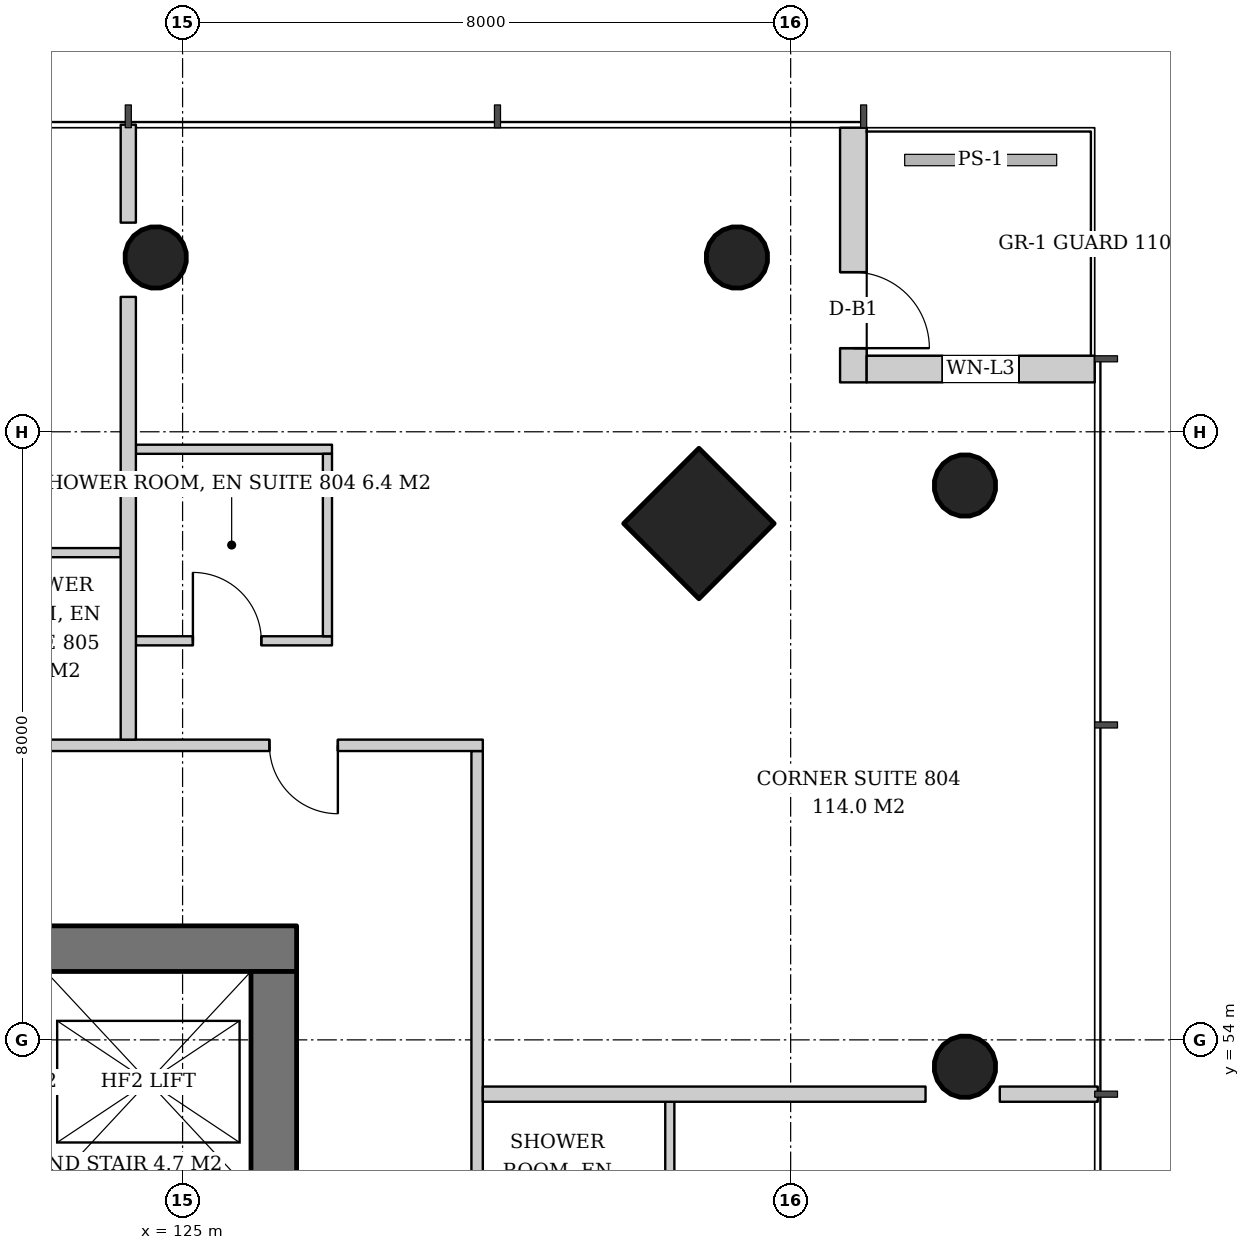
"""IFC4 building model, lengths in metres.
Left out: names, types, materials, properties, quantities, classifications, styles, units other than length and angle.
Written with IfcOpenShell. Run it as: python <this file> out.ifc"""

import sys

from ifc_helpers import new_model, si_unit, direction, frame, frame_2d, origin, origin_2d, place, context, subcontext, project, spatial, rectangle, hollow_circle, extrude, element, fill, save


model = new_model("IFC4")
c1 = context("Model", 3, precision=1e-05, world=origin(), true_north=direction((0.0, 1.0)))
c2 = subcontext(c1, "Body", "Model", "MODEL_VIEW")
j1 = project(units=[si_unit("LENGTHUNIT", "METRE"), si_unit("PLANEANGLEUNIT", "RADIAN")], contexts=[c1])
p1 = place(None, origin())
s1 = spatial("IfcSite", under=j1, at=p1, CompositionType="ELEMENT")
p2 = place(p1, origin())
s2 = spatial("IfcBuilding", under=s1, at=p2, CompositionType="ELEMENT")
p3 = place(p2, frame((0.0, 0.0, 36.2)))
s3 = spatial("IfcBuildingStorey", under=s2, at=p3, CompositionType="ELEMENT", Elevation=36.2)
p4 = place(p3, frame((131.845, 60.845, 0.0), z_axis=(-0.042965756413, -0.042965756413, 0.998152236661), x_axis=(0.707106781187, -0.707106781187, 0.0)))
e1 = element("IfcColumn", 1, at=p4, inside=s3, PredefinedType="COLUMN", context=c2, shape_type="SweptSolid", body=[
    extrude(rectangle(XDim=1.4, YDim=1.4, at=origin_2d()), origin(), (0.0, 0.0, 1.0), 3.807),
])
p5 = place(p3, frame((135.345, 61.345, 0.0), z_axis=(-0.042965756413, -0.042965756413, 0.998152236661), x_axis=(0.707106781187, -0.707106781187, 0.0)))
e2 = element("IfcColumn", 2, at=p5, inside=s3, PredefinedType="COLUMN", context=c2, shape_type="SweptSolid", body=[
    extrude(hollow_circle(Radius=0.406, WallThickness=0.03, at=origin_2d()), origin(), (0.0, 0.0, 1.0), 3.807),
])
p6 = place(p3, frame((135.345, 53.672, 0.0), z_axis=(-0.042995531285, -0.021497765643, 0.998843946952), x_axis=(0.4472135955, -0.894427191, 0.0)))
e3 = element("IfcColumn", 3, at=p6, inside=s3, PredefinedType="COLUMN", context=c2, shape_type="SweptSolid", body=[
    extrude(hollow_circle(Radius=0.406, WallThickness=0.03, at=origin_2d()), origin(), (0.0, 0.0, 1.0), 3.804),
])
p7 = place(p3, frame((132.345, 64.345, 0.0), z_axis=(-0.042965756413, -0.042965756413, 0.998152236661), x_axis=(0.707106781187, -0.707106781187, 0.0)))
e4 = element("IfcColumn", 4, at=p7, inside=s3, PredefinedType="COLUMN", context=c2, shape_type="SweptSolid", body=[
    extrude(hollow_circle(Radius=0.406, WallThickness=0.03, at=origin_2d()), origin(), (0.0, 0.0, 1.0), 3.807),
])
p8 = place(p3, frame((124.672, 64.345, 0.0), z_axis=(-0.021497765643, -0.042995531285, 0.998843946952), x_axis=(0.894427191, -0.4472135955, 0.0)))
e5 = element("IfcColumn", 5, at=p8, inside=s3, PredefinedType="COLUMN", context=c2, shape_type="SweptSolid", body=[
    extrude(hollow_circle(Radius=0.406, WallThickness=0.03, at=origin_2d()), origin(), (0.0, 0.0, 1.0), 3.804),
])
p9 = place(p3, frame((107.5, 55.2, 0.0), z_axis=(0.0, 0.0, 1.0), x_axis=(1.0, 0.0, 0.0)))
e6 = element("IfcWall", 6, at=p9, inside=s3, PredefinedType="SHEAR", context=c2, shape_type="SweptSolid", body=[
    extrude(rectangle(XDim=19.0, YDim=0.6, at=frame_2d((9.5, 0.0))), origin(), (0.0, 0.0, 1.0), 3.8),
])
p10 = place(p9, frame((14.14, 0.0, 0.0)))
e7 = element("IfcOpeningElement", 7, at=p10, cuts=e6, PredefinedType="OPENING", context=c2, shape_type="SweptSolid", body=[
    extrude(rectangle(XDim=1.0, YDim=2.1, at=frame_2d((0.5, 1.05))), frame((0.0, 0.31, 0.0), z_axis=(0.0, -1.0, 0.0), x_axis=(1.0, 0.0, 0.0)), (0.0, 0.0, 1.0), 0.62),
])
p11 = place(p9, frame((2.425, 0.0, 0.0)))
e8 = element("IfcOpeningElement", 8, at=p11, cuts=e6, PredefinedType="OPENING", context=c2, shape_type="SweptSolid", body=[
    extrude(rectangle(XDim=1.0, YDim=2.1, at=frame_2d((0.5, 1.05))), frame((0.0, 0.31, 0.0), z_axis=(0.0, -1.0, 0.0), x_axis=(1.0, 0.0, 0.0)), (0.0, 0.0, 1.0), 0.62),
])
p12 = place(p3, frame((126.2, 37.1, 0.0), z_axis=(0.0, 0.0, 1.0), x_axis=(0.0, 1.0, 0.0)))
e9 = element("IfcWall", 9, at=p12, inside=s3, PredefinedType="SHEAR", context=c2, shape_type="SweptSolid", body=[
    extrude(rectangle(XDim=17.8, YDim=0.6, at=frame_2d((8.9, 0.0))), origin(), (0.0, 0.0, 1.0), 3.8),
])
p13 = place(p12, frame((8.0, 0.0, 0.0)))
e10 = element("IfcOpeningElement", 10, at=p13, cuts=e9, PredefinedType="OPENING", context=c2, shape_type="SweptSolid", body=[
    extrude(rectangle(XDim=1.8, YDim=2.4, at=frame_2d((0.9, 1.2))), frame((0.0, 0.31, 0.0), z_axis=(0.0, -1.0, 0.0), x_axis=(1.0, 0.0, 0.0)), (0.0, 0.0, 1.0), 0.62),
])
p14 = place(p3, frame((133.825, 66.0, 0.0), z_axis=(0.0, 0.0, 1.0), x_axis=(0.0, -1.0, 0.0)))
e11 = element("IfcWall", 11, at=p14, inside=s3, PredefinedType="SOLIDWALL", context=c2, shape_type="SweptSolid", body=[
    extrude(rectangle(XDim=3.35, YDim=0.35, at=frame_2d((1.675, 0.0))), origin(), (0.0, 0.0, 1.0), 3.6),
])
p15 = place(p14, frame((1.9, 0.0, 0.0)))
e12 = element("IfcOpeningElement", 12, at=p15, cuts=e11, PredefinedType="OPENING", context=c2, shape_type="SweptSolid", body=[
    extrude(rectangle(XDim=1.0, YDim=2.4, at=frame_2d((0.5, 1.2))), frame((0.0, 0.185, 0.0), z_axis=(0.0, -1.0, 0.0), x_axis=(1.0, 0.0, 0.0)), (0.0, 0.0, 1.0), 0.37),
])
p16 = place(p3, frame((134.0, 62.825, 0.0), z_axis=(0.0, 0.0, 1.0), x_axis=(1.0, 0.0, 0.0)))
e13 = element("IfcWall", 13, at=p16, inside=s3, PredefinedType="SOLIDWALL", context=c2, shape_type="SweptSolid", body=[
    extrude(rectangle(XDim=3.0, YDim=0.35, at=frame_2d((1.5, 0.0))), origin(), (0.0, 0.0, 1.0), 3.6),
])
p17 = place(p16, frame((1.0, 0.0, 0.9)))
e14 = element("IfcOpeningElement", 14, at=p17, cuts=e13, PredefinedType="OPENING", context=c2, shape_type="SweptSolid", body=[
    extrude(rectangle(XDim=1.0, YDim=2.4, at=frame_2d((0.5, 1.2))), frame((0.0, 0.185, 0.0), z_axis=(0.0, -1.0, 0.0), x_axis=(1.0, 0.0, 0.0)), (0.0, 0.0, 1.0), 0.37),
])
p18 = place(p3, frame((131.41, 50.766, 0.0), z_axis=(0.0, 0.0, 1.0), x_axis=(0.0, 1.0, 0.0)))
e15 = element("IfcWall", 15, at=p18, inside=s3, PredefinedType="PARTITIONING", context=c2, shape_type="SweptSolid", body=[
    extrude(rectangle(XDim=2.42, YDim=0.12, at=frame_2d((1.21, 0.0))), origin(), (0.0, 0.0, 1.0), 2.847),
])
p19 = place(p3, frame((128.875, 34.05, 0.0), z_axis=(0.0, 0.0, 1.0), x_axis=(0.0, 1.0, 0.0)))
e16 = element("IfcWall", 16, at=p19, inside=s3, PredefinedType="PARTITIONING", context=c2, shape_type="SweptSolid", body=[
    extrude(rectangle(XDim=23.75, YDim=0.15, at=frame_2d((11.875, 0.0))), origin(), (0.0, 0.0, 1.0), 2.8),
])
p20 = place(p19, frame((1.907, 0.0, 0.0)))
e17 = element("IfcOpeningElement", 17, at=p20, cuts=e16, PredefinedType="OPENING", context=c2, shape_type="SweptSolid", body=[
    extrude(rectangle(XDim=0.9, YDim=2.1, at=frame_2d((0.45, 1.05))), frame((0.0, 0.085, 0.0), z_axis=(0.0, -1.0, 0.0), x_axis=(1.0, 0.0, 0.0)), (0.0, 0.0, 1.0), 0.17),
])
p21 = place(p19, frame((12.271, 0.0, 0.0)))
e18 = element("IfcOpeningElement", 18, at=p21, cuts=e16, PredefinedType="OPENING", context=c2, shape_type="SweptSolid", body=[
    extrude(rectangle(XDim=0.9, YDim=2.1, at=frame_2d((0.45, 1.05))), frame((0.0, 0.085, 0.0), z_axis=(0.0, -1.0, 0.0), x_axis=(1.0, 0.0, 0.0)), (0.0, 0.0, 1.0), 0.17),
])
p22 = place(p19, frame((15.586, 0.0, 0.0)))
e19 = element("IfcOpeningElement", 19, at=p22, cuts=e16, PredefinedType="OPENING", context=c2, shape_type="SweptSolid", body=[
    extrude(rectangle(XDim=0.9, YDim=2.1, at=frame_2d((0.45, 1.05))), frame((0.0, 0.085, 0.0), z_axis=(0.0, -1.0, 0.0), x_axis=(1.0, 0.0, 0.0)), (0.0, 0.0, 1.0), 0.17),
])
p23 = place(p3, frame((128.95, 53.286, 0.0), z_axis=(0.0, 0.0, 1.0), x_axis=(1.0, 0.0, 0.0)))
e20 = element("IfcWall", 20, at=p23, inside=s3, PredefinedType="PARTITIONING", context=c2, shape_type="SweptSolid", body=[
    extrude(rectangle(XDim=5.824, YDim=0.2, at=frame_2d((2.912, 0.0))), origin(), (0.0, 0.0, 1.0), 3.6),
])
p24 = place(p3, frame((135.751, 53.286, 0.0), z_axis=(0.0, 0.0, 1.0), x_axis=(1.0, 0.0, 0.0)))
e21 = element("IfcWall", 21, at=p24, inside=s3, PredefinedType="PARTITIONING", context=c2, shape_type="SweptSolid", body=[
    extrude(rectangle(XDim=1.289, YDim=0.2, at=frame_2d((0.645, 0.0))), origin(), (0.0, 0.0, 1.0), 3.6),
])
p25 = place(p3, frame((124.386, 59.25, 0.0), z_axis=(0.0, 0.0, 1.0), x_axis=(1.0, 0.0, 0.0)))
e22 = element("IfcWall", 22, at=p25, inside=s3, PredefinedType="PARTITIONING", context=c2, shape_type="SweptSolid", body=[
    extrude(rectangle(XDim=2.58, YDim=0.12, at=frame_2d((1.29, 0.0))), origin(), (0.0, 0.0, 1.0), 2.8),
])
p26 = place(p25, frame((0.75, 0.0, 0.0)))
e23 = element("IfcOpeningElement", 23, at=p26, cuts=e22, PredefinedType="OPENING", context=c2, shape_type="SweptSolid", body=[
    extrude(rectangle(XDim=0.9, YDim=2.1, at=frame_2d((0.45, 1.05))), frame((0.0, 0.07, 0.0), z_axis=(0.0, -1.0, 0.0), x_axis=(1.0, 0.0, 0.0)), (0.0, 0.0, 1.0), 0.14),
])
p27 = place(p3, frame((124.386, 61.77, 0.0), z_axis=(0.0, 0.0, 1.0), x_axis=(1.0, 0.0, 0.0)))
e24 = element("IfcWall", 24, at=p27, inside=s3, PredefinedType="PARTITIONING", context=c2, shape_type="SweptSolid", body=[
    extrude(rectangle(XDim=2.58, YDim=0.12, at=frame_2d((1.29, 0.0))), origin(), (0.0, 0.0, 1.0), 2.8),
])
p28 = place(p3, frame((126.906, 59.31, 0.0), z_axis=(0.0, 0.0, 1.0), x_axis=(0.0, 1.0, 0.0)))
e25 = element("IfcWall", 25, at=p28, inside=s3, PredefinedType="PARTITIONING", context=c2, shape_type="SweptSolid", body=[
    extrude(rectangle(XDim=2.4, YDim=0.12, at=frame_2d((1.2, 0.0))), origin(), (0.0, 0.0, 1.0), 2.847),
])
p29 = place(p3, frame((124.186, 60.41, 0.0), z_axis=(0.0, 0.0, 1.0), x_axis=(-1.0, 0.0, 0.0)))
e26 = element("IfcWall", 26, at=p29, inside=s3, PredefinedType="PARTITIONING", context=c2, shape_type="SweptSolid", body=[
    extrude(rectangle(XDim=2.42, YDim=0.12, at=frame_2d((1.21, 0.0))), origin(), (0.0, 0.0, 1.0), 2.847),
])
p30 = place(p3, frame((128.95, 57.875, 0.0), z_axis=(0.0, 0.0, 1.0), x_axis=(-1.0, 0.0, 0.0)))
e27 = element("IfcWall", 27, at=p30, inside=s3, PredefinedType="PARTITIONING", context=c2, shape_type="SweptSolid", body=[
    extrude(rectangle(XDim=23.75, YDim=0.15, at=frame_2d((11.875, 0.0))), origin(), (0.0, 0.0, 1.0), 2.8),
])
p31 = place(p30, frame((1.907, 0.0, 0.0)))
e28 = element("IfcOpeningElement", 28, at=p31, cuts=e27, PredefinedType="OPENING", context=c2, shape_type="SweptSolid", body=[
    extrude(rectangle(XDim=0.9, YDim=2.1, at=frame_2d((0.45, 1.05))), frame((0.0, 0.085, 0.0), z_axis=(0.0, -1.0, 0.0), x_axis=(1.0, 0.0, 0.0)), (0.0, 0.0, 1.0), 0.17),
])
p32 = place(p30, frame((7.414, 0.0, 0.0)))
e29 = element("IfcOpeningElement", 29, at=p32, cuts=e27, PredefinedType="OPENING", context=c2, shape_type="SweptSolid", body=[
    extrude(rectangle(XDim=0.9, YDim=2.1, at=frame_2d((0.45, 1.05))), frame((0.0, 0.085, 0.0), z_axis=(0.0, -1.0, 0.0), x_axis=(1.0, 0.0, 0.0)), (0.0, 0.0, 1.0), 0.17),
])
p33 = place(p30, frame((17.129, 0.0, 0.0)))
e30 = element("IfcOpeningElement", 30, at=p33, cuts=e27, PredefinedType="OPENING", context=c2, shape_type="SweptSolid", body=[
    extrude(rectangle(XDim=0.9, YDim=2.1, at=frame_2d((0.45, 1.05))), frame((0.0, 0.085, 0.0), z_axis=(0.0, -1.0, 0.0), x_axis=(1.0, 0.0, 0.0)), (0.0, 0.0, 1.0), 0.17),
])
p34 = place(p3, frame((124.286, 57.95, 0.0), z_axis=(0.0, 0.0, 1.0), x_axis=(0.0, 1.0, 0.0)))
e31 = element("IfcWall", 31, at=p34, inside=s3, PredefinedType="PARTITIONING", context=c2, shape_type="SweptSolid", body=[
    extrude(rectangle(XDim=5.824, YDim=0.2, at=frame_2d((2.912, 0.0))), origin(), (0.0, 0.0, 1.0), 3.6),
])
p35 = place(p3, frame((124.286, 64.751, 0.0), z_axis=(0.0, 0.0, 1.0), x_axis=(0.0, 1.0, 0.0)))
e32 = element("IfcWall", 32, at=p35, inside=s3, PredefinedType="PARTITIONING", context=c2, shape_type="SweptSolid", body=[
    extrude(rectangle(XDim=1.289, YDim=0.2, at=frame_2d((0.645, 0.0))), origin(), (0.0, 0.0, 1.0), 3.6),
])
p36 = place(p15, origin())
e33 = element("IfcDoor", 33, at=p36, inside=s3, OperationType="SINGLE_SWING_RIGHT", PredefinedType="DOOR", context=c2, shape_type="SweptSolid", body=[
    extrude(rectangle(XDim=1.0, YDim=2.4, at=frame_2d((0.5, 1.2))), frame((0.0, 0.025, 0.0), z_axis=(0.0, -1.0, 0.0), x_axis=(1.0, 0.0, 0.0)), (0.0, 0.0, 1.0), 0.05),
])
fill(e12, e33)
p37 = place(p17, origin())
e34 = element("IfcWindow", 34, at=p37, inside=s3, PartitioningType="SINGLE_PANEL", PredefinedType="WINDOW", context=c2, shape_type="SweptSolid", body=[
    extrude(rectangle(XDim=1.0, YDim=2.4, at=frame_2d((0.5, 1.2))), frame((0.0, 0.03, 0.0), z_axis=(0.0, -1.0, 0.0), x_axis=(1.0, 0.0, 0.0)), (0.0, 0.0, 1.0), 0.06),
])
fill(e14, e34)
p38 = place(p26, origin())
e35 = element("IfcDoor", 35, at=p38, inside=s3, OperationType="SINGLE_SWING_LEFT", PredefinedType="DOOR", context=c2, shape_type="SweptSolid", body=[
    extrude(rectangle(XDim=0.9, YDim=2.1, at=frame_2d((0.45, 1.05))), frame((0.0, 0.025, 0.0), z_axis=(0.0, -1.0, 0.0), x_axis=(1.0, 0.0, 0.0)), (0.0, 0.0, 1.0), 0.05),
])
fill(e23, e35)
p39 = place(p31, origin())
e36 = element("IfcDoor", 36, at=p39, inside=s3, OperationType="SINGLE_SWING_LEFT", PredefinedType="DOOR", context=c2, shape_type="SweptSolid", body=[
    extrude(rectangle(XDim=0.9, YDim=2.1, at=frame_2d((0.45, 1.05))), frame((0.0, 0.025, 0.0), z_axis=(0.0, -1.0, 0.0), x_axis=(1.0, 0.0, 0.0)), (0.0, 0.0, 1.0), 0.05),
])
fill(e28, e36)
save(model, sys.argv[1])
